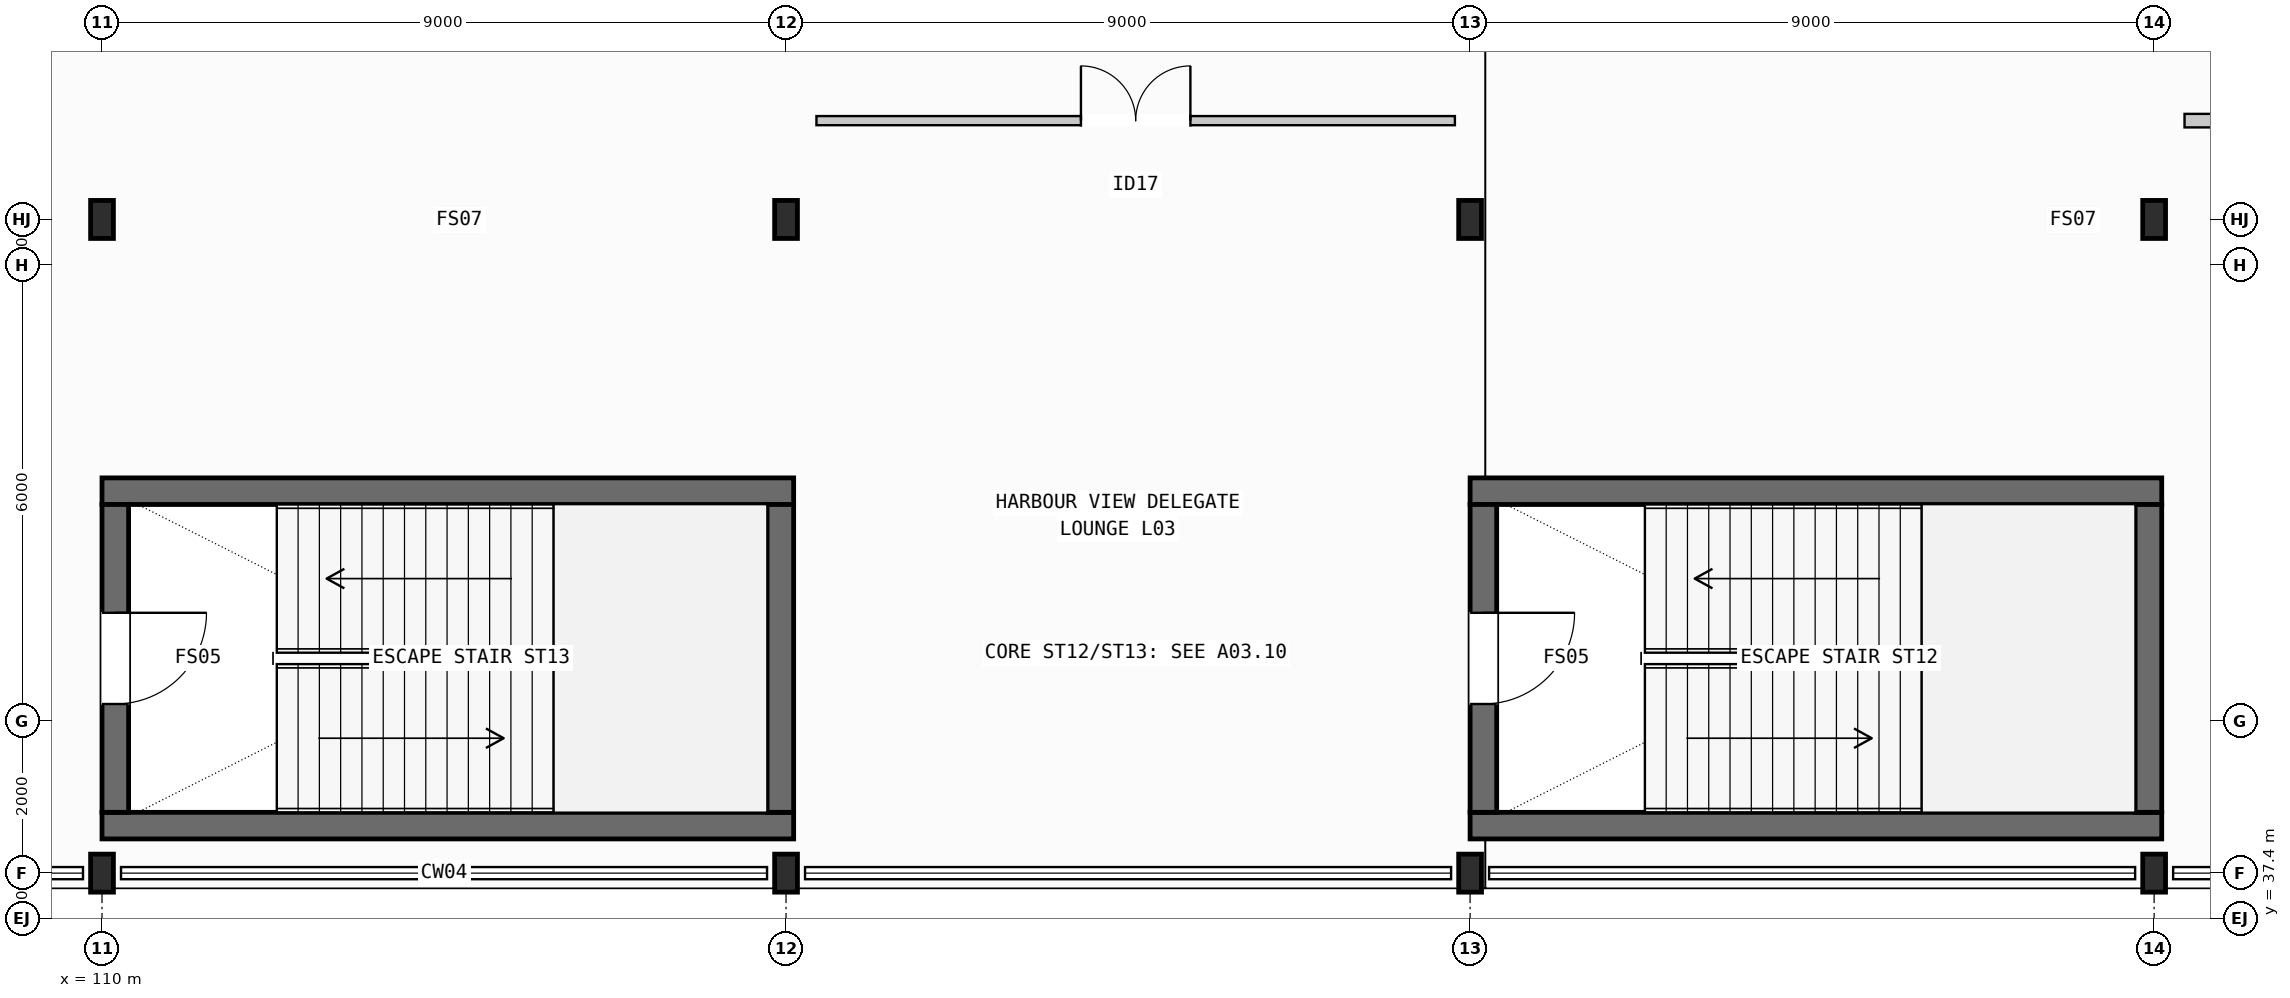
"""IFC4 building model, lengths in metres.
Left out: names, types, materials, properties, quantities, classifications, styles, units other than length and angle.
Written with IfcOpenShell. Run it as: python <this file> out.ifc"""

import sys

from ifc_helpers import new_model, si_unit, direction, frame, frame_2d, origin, origin_2d, place, context, subcontext, project, spatial, rectangle, i_section, extrude, element, fill, save


model = new_model("IFC4")
c1 = context("Model", 3, precision=1e-05, world=origin(), true_north=direction((0.0, 1.0)))
c2 = subcontext(c1, "Body", "Model", "MODEL_VIEW")
j1 = project(units=[si_unit("LENGTHUNIT", "METRE"), si_unit("PLANEANGLEUNIT", "RADIAN")], contexts=[c1])
p1 = place(None, origin())
s1 = spatial("IfcSite", under=j1, at=p1, CompositionType="ELEMENT")
p2 = place(p1, origin())
s2 = spatial("IfcBuilding", under=s1, at=p2, CompositionType="ELEMENT")
p3 = place(p2, frame((0.0, 0.0, 16.8)))
s3 = spatial("IfcBuildingStorey", under=s2, at=p3, CompositionType="ELEMENT", Elevation=16.8)
for number, where, z_axis, x_axis in (
    (1, (110.0, 38.0, 0.0), (0.0, 0.0, 1.0), (1.0, 0.0, 0.0)),
    (2, (110.0, 46.6, 0.0), (0.0, 0.0, 1.0), (1.0, 0.0, 0.0)),
    (3, (119.0, 38.0, 0.0), (0.0, 0.0, 1.0), (1.0, 0.0, 0.0)),
    (4, (119.0, 46.6, 0.0), (0.0, 0.0, 1.0), (1.0, 0.0, 0.0)),
    (5, (128.0, 38.0, 0.0), (0.0, 0.0, 1.0), (1.0, 0.0, 0.0)),
    (6, (128.0, 46.6, 0.0), (0.0, 0.0, 1.0), (1.0, 0.0, 0.0)),
    (7, (137.0, 38.0, 0.0), (0.0, 0.0, 1.0), (1.0, 0.0, 0.0)),
    (8, (137.0, 46.6, 0.0), (0.0, 0.0, 1.0), (1.0, 0.0, 0.0)),
):
    element("IfcColumn", number, at=place(p3, frame(where, z_axis=z_axis, x_axis=x_axis)), inside=s3, PredefinedType="COLUMN", context=c2, shape_type="SweptSolid", body=[
        extrude(i_section(OverallWidth=0.3, OverallDepth=0.5, WebThickness=0.014, FlangeThickness=0.028, FilletRadius=0.027, at=origin_2d()), origin(), (0.0, 0.0, 1.0), 4.8),
    ])
for number, where, z_axis, x_axis in (
    (9, (128.0, 38.625, 0.0), (0.0, 0.0, 1.0), (1.0, 0.0, 0.0)),
    (10, (128.0, 43.025, 0.0), (0.0, 0.0, 1.0), (1.0, 0.0, 0.0)),
):
    element("IfcWall", number, at=place(p3, frame(where, z_axis=z_axis, x_axis=x_axis)), inside=s3, PredefinedType="SHEAR", context=c2, shape_type="SweptSolid", body=[
        extrude(rectangle(XDim=9.1, YDim=0.35, at=frame_2d((4.55, 0.0))), origin(), (0.0, 0.0, 1.0), 4.8),
    ])
p4 = place(p3, frame((128.175, 38.8, 0.0), z_axis=(0.0, 0.0, 1.0), x_axis=(0.0, 1.0, 0.0)))
e11 = element("IfcWall", 11, at=p4, inside=s3, PredefinedType="SHEAR", context=c2, shape_type="SweptSolid", body=[
    extrude(rectangle(XDim=4.05, YDim=0.35, at=frame_2d((2.025, 0.0))), origin(), (0.0, 0.0, 1.0), 4.8),
])
p5 = place(p4, frame((1.425, 0.0, 0.0)))
e12 = element("IfcOpeningElement", 12, at=p5, cuts=e11, PredefinedType="OPENING", context=c2, shape_type="SweptSolid", body=[
    extrude(rectangle(XDim=1.2, YDim=2.2, at=frame_2d((0.6, 1.1))), frame((0.0, 0.185, 0.0), z_axis=(0.0, -1.0, 0.0), x_axis=(1.0, 0.0, 0.0)), (0.0, 0.0, 1.0), 0.37),
])
p6 = place(p3, frame((136.925, 38.8, 0.0), z_axis=(0.0, 0.0, 1.0), x_axis=(0.0, 1.0, 0.0)))
e13 = element("IfcWall", 13, at=p6, inside=s3, PredefinedType="SHEAR", context=c2, shape_type="SweptSolid", body=[
    extrude(rectangle(XDim=4.05, YDim=0.35, at=frame_2d((2.025, 0.0))), origin(), (0.0, 0.0, 1.0), 4.8),
])
for number, where, z_axis, x_axis in (
    (14, (110.0, 38.625, 0.0), (0.0, 0.0, 1.0), (1.0, 0.0, 0.0)),
    (15, (110.0, 43.025, 0.0), (0.0, 0.0, 1.0), (1.0, 0.0, 0.0)),
):
    element("IfcWall", number, at=place(p3, frame(where, z_axis=z_axis, x_axis=x_axis)), inside=s3, PredefinedType="SHEAR", context=c2, shape_type="SweptSolid", body=[
        extrude(rectangle(XDim=9.1, YDim=0.35, at=frame_2d((4.55, 0.0))), origin(), (0.0, 0.0, 1.0), 4.8),
    ])
p7 = place(p3, frame((110.175, 38.8, 0.0), z_axis=(0.0, 0.0, 1.0), x_axis=(0.0, 1.0, 0.0)))
e16 = element("IfcWall", 16, at=p7, inside=s3, PredefinedType="SHEAR", context=c2, shape_type="SweptSolid", body=[
    extrude(rectangle(XDim=4.05, YDim=0.35, at=frame_2d((2.025, 0.0))), origin(), (0.0, 0.0, 1.0), 4.8),
])
p8 = place(p7, frame((1.425, 0.0, 0.0)))
e17 = element("IfcOpeningElement", 17, at=p8, cuts=e16, PredefinedType="OPENING", context=c2, shape_type="SweptSolid", body=[
    extrude(rectangle(XDim=1.2, YDim=2.2, at=frame_2d((0.6, 1.1))), frame((0.0, 0.185, 0.0), z_axis=(0.0, -1.0, 0.0), x_axis=(1.0, 0.0, 0.0)), (0.0, 0.0, 1.0), 0.37),
])
p9 = place(p3, frame((118.925, 38.8, 0.0), z_axis=(0.0, 0.0, 1.0), x_axis=(0.0, 1.0, 0.0)))
e18 = element("IfcWall", 18, at=p9, inside=s3, PredefinedType="SHEAR", context=c2, shape_type="SweptSolid", body=[
    extrude(rectangle(XDim=4.05, YDim=0.35, at=frame_2d((2.025, 0.0))), origin(), (0.0, 0.0, 1.0), 4.8),
])
p10 = place(p3, frame((119.4, 47.9, 0.0), z_axis=(0.0, 0.0, 1.0), x_axis=(1.0, 0.0, 0.0)))
e19 = element("IfcWall", 19, at=p10, inside=s3, PredefinedType="PARTITIONING", context=c2, shape_type="SweptSolid", body=[
    extrude(rectangle(XDim=8.4, YDim=0.12, at=frame_2d((4.2, 0.0))), origin(), (0.0, 0.0, 1.0), 4.0),
])
p11 = place(p10, frame((3.48, 0.0, 0.0)))
e20 = element("IfcOpeningElement", 20, at=p11, cuts=e19, PredefinedType="OPENING", context=c2, shape_type="SweptSolid", body=[
    extrude(rectangle(XDim=1.44, YDim=2.2, at=frame_2d((0.72, 1.1))), frame((0.0, 0.07, 0.0), z_axis=(0.0, -1.0, 0.0), x_axis=(1.0, 0.0, 0.0)), (0.0, 0.0, 1.0), 0.14),
])
p12 = place(p3, frame((137.4, 47.9, 0.0), z_axis=(0.0, 0.0, 1.0), x_axis=(1.0, 0.0, 0.0)))
e21 = element("IfcWall", 21, at=p12, inside=s3, PredefinedType="PARTITIONING", context=c2, shape_type="SweptSolid", body=[
    extrude(rectangle(XDim=8.0, YDim=0.178, at=frame_2d((4.0, 0.0))), origin(), (0.0, 0.0, 1.0), 4.0),
])
p13 = place(p12, frame((3.55, 0.0, 0.0)))
e22 = element("IfcOpeningElement", 22, at=p13, cuts=e21, PredefinedType="OPENING", context=c2, shape_type="SweptSolid", body=[
    extrude(rectangle(XDim=0.9, YDim=2.08, at=frame_2d((0.45, 1.04))), frame((0.0, 0.099, 0.0), z_axis=(0.0, -1.0, 0.0), x_axis=(1.0, 0.0, 0.0)), (0.0, 0.0, 1.0), 0.198),
])
p14 = place(p5, frame((1.2, 0.0, 0.0), z_axis=(0.0, 0.0, 1.0), x_axis=(-1.0, 0.0, 0.0)))
e23 = element("IfcDoor", 23, at=p14, inside=s3, OperationType="SINGLE_SWING_LEFT", PredefinedType="DOOR", context=c2, shape_type="SweptSolid", body=[
    extrude(rectangle(XDim=1.2, YDim=2.2, at=frame_2d((0.6, 1.1))), frame((0.0, 0.025, 0.0), z_axis=(0.0, -1.0, 0.0), x_axis=(1.0, 0.0, 0.0)), (0.0, 0.0, 1.0), 0.05),
])
fill(e12, e23)
p15 = place(p8, frame((1.2, 0.0, 0.0), z_axis=(0.0, 0.0, 1.0), x_axis=(-1.0, 0.0, 0.0)))
e24 = element("IfcDoor", 24, at=p15, inside=s3, OperationType="SINGLE_SWING_LEFT", PredefinedType="DOOR", context=c2, shape_type="SweptSolid", body=[
    extrude(rectangle(XDim=1.2, YDim=2.2, at=frame_2d((0.6, 1.1))), frame((0.0, 0.025, 0.0), z_axis=(0.0, -1.0, 0.0), x_axis=(1.0, 0.0, 0.0)), (0.0, 0.0, 1.0), 0.05),
])
fill(e17, e24)
p16 = place(p11, origin())
e25 = element("IfcDoor", 25, at=p16, inside=s3, OperationType="DOUBLE_DOOR_SINGLE_SWING", PredefinedType="DOOR", context=c2, shape_type="SweptSolid", body=[
    extrude(rectangle(XDim=1.44, YDim=2.2, at=frame_2d((0.72, 1.1))), frame((0.0, 0.025, 0.0), z_axis=(0.0, -1.0, 0.0), x_axis=(1.0, 0.0, 0.0)), (0.0, 0.0, 1.0), 0.05),
])
fill(e20, e25)
save(model, sys.argv[1])
